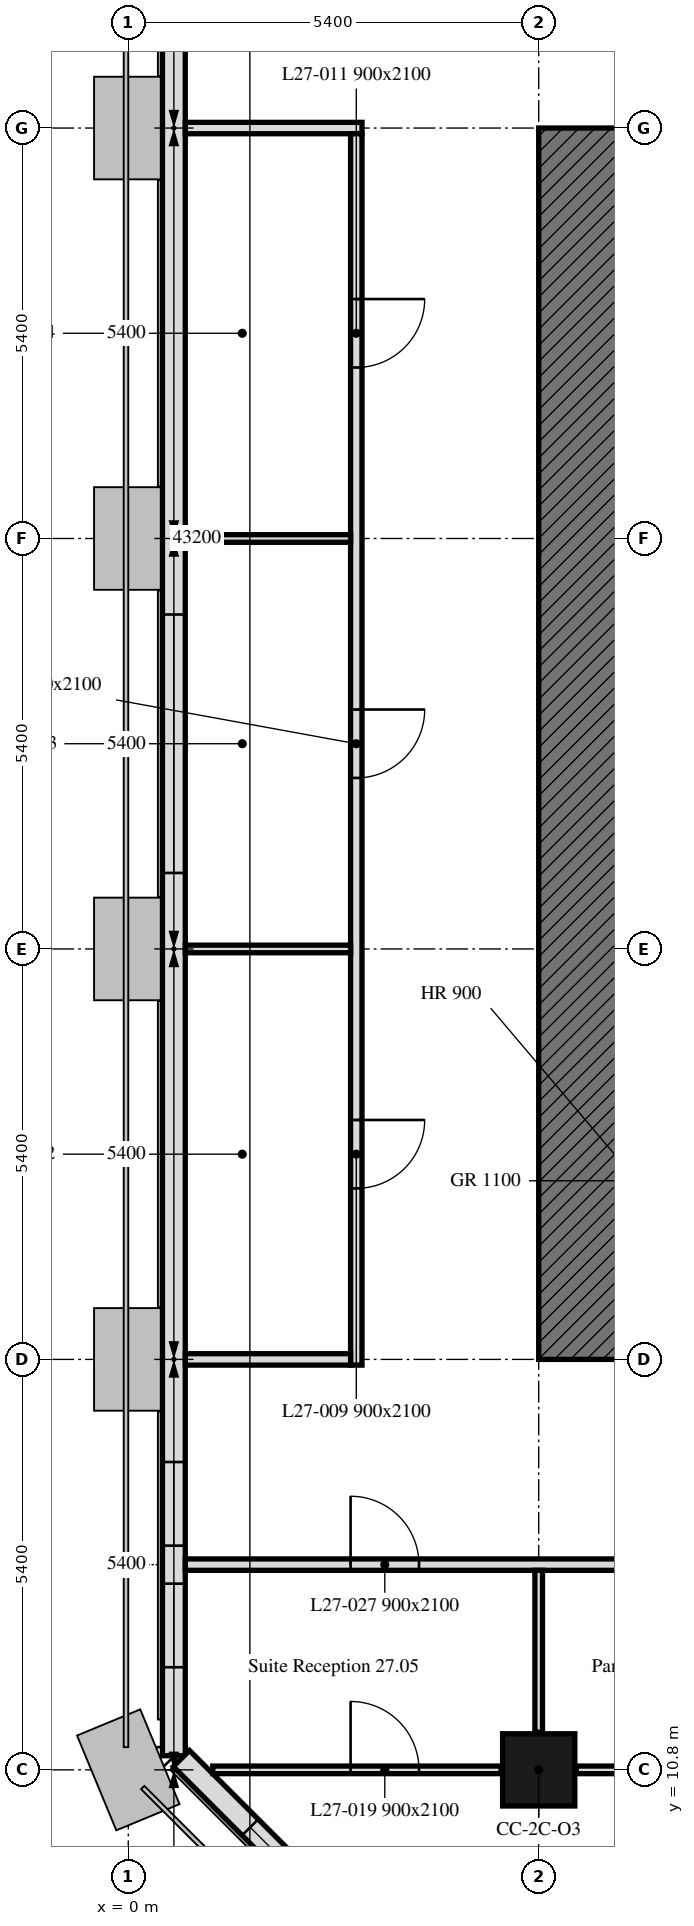
"""IFC4 building model, lengths in metres.
Left out: names, types, materials, properties, quantities, classifications, styles, units other than length and angle.
Written with IfcOpenShell. Run it as: python <this file> out.ifc"""

import sys

from ifc_helpers import new_model, si_unit, direction, frame, frame_2d, origin, origin_2d, place, context, subcontext, project, spatial, rectangle, extrude, element, fill, save


model = new_model("IFC4")
c1 = context("Model", 3, precision=1e-05, world=origin(), true_north=direction((0.0, 1.0)))
c2 = subcontext(c1, "Body", "Model", "MODEL_VIEW")
j1 = project(units=[si_unit("LENGTHUNIT", "METRE"), si_unit("PLANEANGLEUNIT", "RADIAN")], contexts=[c1])
p1 = place(None, origin())
s1 = spatial("IfcSite", under=j1, at=p1, CompositionType="ELEMENT")
p2 = place(p1, origin())
s2 = spatial("IfcBuilding", under=s1, at=p2, CompositionType="ELEMENT")
p3 = place(p2, frame((0.0, 0.0, 114.4)))
s3 = spatial("IfcBuildingStorey", under=s2, at=p3, CompositionType="ELEMENT", Elevation=114.4)
p4 = place(p3, frame((5.4, 10.8, 0.0), z_axis=(0.0, 0.0, 1.0), x_axis=(1.0, 0.0, 0.0)))
e1 = element("IfcColumn", 1, at=p4, inside=s3, PredefinedType="COLUMN", context=c2, shape_type="SweptSolid", body=[
    extrude(rectangle(XDim=0.95, YDim=0.95, at=origin_2d()), origin(), (0.0, 0.0, 1.0), 3.5),
])
p5 = place(p3, frame((0.6, 43.014, 0.0), z_axis=(0.0, 0.0, 1.0), x_axis=(0.0, -1.0, 0.0)))
e2 = element("IfcWall", 2, at=p5, inside=s3, PredefinedType="SOLIDWALL", context=c2, shape_type="SweptSolid", body=[
    extrude(rectangle(XDim=32.027, YDim=0.3, at=frame_2d((16.014, 0.0))), origin(), (0.0, 0.0, 1.0), 3.5),
])
p6 = place(p5, frame((6.564, 0.0, 0.9)))
e3 = element("IfcOpeningElement", 3, at=p6, cuts=e2, PredefinedType="OPENING", context=c2, shape_type="SweptSolid", body=[
    extrude(rectangle(XDim=1.1, YDim=1.7, at=frame_2d((0.55, 0.85))), frame((0.0, 0.16, 0.0), z_axis=(0.0, -1.0, 0.0), x_axis=(1.0, 0.0, 0.0)), (0.0, 0.0, 1.0), 0.32),
])
p7 = place(p5, frame((8.164, 0.0, 0.9)))
e4 = element("IfcOpeningElement", 4, at=p7, cuts=e2, PredefinedType="OPENING", context=c2, shape_type="SweptSolid", body=[
    extrude(rectangle(XDim=1.1, YDim=1.7, at=frame_2d((0.55, 0.85))), frame((0.0, 0.16, 0.0), z_axis=(0.0, -1.0, 0.0), x_axis=(1.0, 0.0, 0.0)), (0.0, 0.0, 1.0), 0.32),
])
p8 = place(p5, frame((17.014, 0.0, 0.9)))
e5 = element("IfcOpeningElement", 5, at=p8, cuts=e2, PredefinedType="OPENING", context=c2, shape_type="SweptSolid", body=[
    extrude(rectangle(XDim=3.4, YDim=1.7, at=frame_2d((1.7, 0.85))), frame((0.0, 0.16, 0.0), z_axis=(0.0, -1.0, 0.0), x_axis=(1.0, 0.0, 0.0)), (0.0, 0.0, 1.0), 0.32),
])
p9 = place(p5, frame((28.164, 0.0, 0.9)))
e6 = element("IfcOpeningElement", 6, at=p9, cuts=e2, PredefinedType="OPENING", context=c2, shape_type="SweptSolid", body=[
    extrude(rectangle(XDim=1.1, YDim=1.7, at=frame_2d((0.55, 0.85))), frame((0.0, 0.16, 0.0), z_axis=(0.0, -1.0, 0.0), x_axis=(1.0, 0.0, 0.0)), (0.0, 0.0, 1.0), 0.32),
])
p10 = place(p5, frame((29.764, 0.0, 0.9)))
e7 = element("IfcOpeningElement", 7, at=p10, cuts=e2, PredefinedType="OPENING", context=c2, shape_type="SweptSolid", body=[
    extrude(rectangle(XDim=1.1, YDim=1.7, at=frame_2d((0.55, 0.85))), frame((0.0, 0.16, 0.0), z_axis=(0.0, -1.0, 0.0), x_axis=(1.0, 0.0, 0.0)), (0.0, 0.0, 1.0), 0.32),
])
p11 = place(p3, frame((0.699, 10.949, 0.0), z_axis=(0.0, 0.0, 1.0), x_axis=(0.707106781187, -0.707106781187, 0.0)))
e8 = element("IfcWall", 8, at=p11, inside=s3, PredefinedType="SOLIDWALL", context=c2, shape_type="SweptSolid", body=[
    extrude(rectangle(XDim=6.86, YDim=0.3, at=frame_2d((3.43, 0.0))), origin(), (0.0, 0.0, 1.0), 3.5),
])
p12 = place(p11, frame((1.28, 0.0, 0.9)))
e9 = element("IfcOpeningElement", 9, at=p12, cuts=e8, PredefinedType="OPENING", context=c2, shape_type="SweptSolid", body=[
    extrude(rectangle(XDim=1.1, YDim=1.7, at=frame_2d((0.55, 0.85))), frame((0.0, 0.16, 0.0), z_axis=(0.0, -1.0, 0.0), x_axis=(1.0, 0.0, 0.0)), (0.0, 0.0, 1.0), 0.32),
])
p13 = place(p11, frame((4.48, 0.0, 0.9)))
e10 = element("IfcOpeningElement", 10, at=p13, cuts=e8, PredefinedType="OPENING", context=c2, shape_type="SweptSolid", body=[
    extrude(rectangle(XDim=1.1, YDim=1.7, at=frame_2d((0.55, 0.85))), frame((0.0, 0.16, 0.0), z_axis=(0.0, -1.0, 0.0), x_axis=(1.0, 0.0, 0.0)), (0.0, 0.0, 1.0), 0.32),
])
p14 = place(p3, frame((6.0, 16.2, 0.0), z_axis=(0.0, 0.0, 1.0), x_axis=(0.0, 1.0, 0.0)))
e11 = element("IfcWall", 11, at=p14, inside=s3, PredefinedType="SOLIDWALL", context=c2, shape_type="SweptSolid", body=[
    extrude(rectangle(XDim=16.2, YDim=1.2, at=frame_2d((8.1, 0.0))), origin(), (0.0, 0.0, 1.0), 3.5),
])
p15 = place(p3, frame((0.751, 32.4, 0.0), z_axis=(0.0, 0.0, 1.0), x_axis=(1.0, 0.0, 0.0)))
e12 = element("IfcWall", 12, at=p15, inside=s3, PredefinedType="PARTITIONING", context=c2, shape_type="SweptSolid", body=[
    extrude(rectangle(XDim=2.324, YDim=0.15, at=frame_2d((1.162, 0.0))), origin(), (0.0, 0.0, 1.0), 2.75),
])
p16 = place(p3, frame((3.0, 32.325, 0.0), z_axis=(0.0, 0.0, 1.0), x_axis=(0.0, -1.0, 0.0)))
e13 = element("IfcWall", 13, at=p16, inside=s3, PredefinedType="PARTITIONING", context=c2, shape_type="SweptSolid", body=[
    extrude(rectangle(XDim=16.2, YDim=0.15, at=frame_2d((8.1, 0.0))), origin(), (0.0, 0.0, 1.0), 2.75),
])
p17 = place(p16, frame((12.975, 0.0, 0.0)))
e14 = element("IfcOpeningElement", 14, at=p17, cuts=e13, PredefinedType="OPENING", context=c2, shape_type="SweptSolid", body=[
    extrude(rectangle(XDim=0.9, YDim=2.1, at=frame_2d((0.45, 1.05))), frame((0.0, 0.075, 0.0), z_axis=(0.0, -1.0, 0.0), x_axis=(1.0, 0.0, 0.0)), (0.0, 0.0, 1.0), 0.15),
])
p18 = place(p16, frame((7.575, 0.0, 0.0)))
e15 = element("IfcOpeningElement", 15, at=p18, cuts=e13, PredefinedType="OPENING", context=c2, shape_type="SweptSolid", body=[
    extrude(rectangle(XDim=0.9, YDim=2.1, at=frame_2d((0.45, 1.05))), frame((0.0, 0.075, 0.0), z_axis=(0.0, -1.0, 0.0), x_axis=(1.0, 0.0, 0.0)), (0.0, 0.0, 1.0), 0.15),
])
p19 = place(p16, frame((2.175, 0.0, 0.0)))
e16 = element("IfcOpeningElement", 16, at=p19, cuts=e13, PredefinedType="OPENING", context=c2, shape_type="SweptSolid", body=[
    extrude(rectangle(XDim=0.9, YDim=2.1, at=frame_2d((0.45, 1.05))), frame((0.0, 0.075, 0.0), z_axis=(0.0, -1.0, 0.0), x_axis=(1.0, 0.0, 0.0)), (0.0, 0.0, 1.0), 0.15),
])
p20 = place(p3, frame((2.925, 16.2, 0.0), z_axis=(0.0, 0.0, 1.0), x_axis=(-1.0, 0.0, 0.0)))
e17 = element("IfcWall", 17, at=p20, inside=s3, PredefinedType="PARTITIONING", context=c2, shape_type="SweptSolid", body=[
    extrude(rectangle(XDim=2.174, YDim=0.15, at=frame_2d((1.087, 0.0))), origin(), (0.0, 0.0, 1.0), 2.75),
])
p21 = place(p3, frame((0.751, 13.5, 0.0), z_axis=(0.0, 0.0, 1.0), x_axis=(1.0, 0.0, 0.0)))
e18 = element("IfcWall", 18, at=p21, inside=s3, PredefinedType="PARTITIONING", context=c2, shape_type="SweptSolid", body=[
    extrude(rectangle(XDim=41.698, YDim=0.15, at=frame_2d((20.849, 0.0))), origin(), (0.0, 0.0, 1.0), 3.5),
])
p22 = place(p21, frame((6.279, 0.0, 0.0)))
e19 = element("IfcOpeningElement", 19, at=p22, cuts=e18, PredefinedType="OPENING", context=c2, shape_type="SweptSolid", body=[
    extrude(rectangle(XDim=0.9, YDim=2.1, at=frame_2d((0.45, 1.05))), frame((0.0, 0.075, 0.0), z_axis=(0.0, -1.0, 0.0), x_axis=(1.0, 0.0, 0.0)), (0.0, 0.0, 1.0), 0.15),
])
p23 = place(p21, frame((7.519, 0.0, 0.0)))
e20 = element("IfcOpeningElement", 20, at=p23, cuts=e18, PredefinedType="OPENING", context=c2, shape_type="SweptSolid", body=[
    extrude(rectangle(XDim=0.9, YDim=2.1, at=frame_2d((0.45, 1.05))), frame((0.0, 0.075, 0.0), z_axis=(0.0, -1.0, 0.0), x_axis=(1.0, 0.0, 0.0)), (0.0, 0.0, 1.0), 0.15),
])
p24 = place(p21, frame((11.679, 0.0, 0.0)))
e21 = element("IfcOpeningElement", 21, at=p24, cuts=e18, PredefinedType="OPENING", context=c2, shape_type="SweptSolid", body=[
    extrude(rectangle(XDim=0.9, YDim=2.1, at=frame_2d((0.45, 1.05))), frame((0.0, 0.075, 0.0), z_axis=(0.0, -1.0, 0.0), x_axis=(1.0, 0.0, 0.0)), (0.0, 0.0, 1.0), 0.15),
])
p25 = place(p21, frame((22.479, 0.0, 0.0)))
e22 = element("IfcOpeningElement", 22, at=p25, cuts=e18, PredefinedType="OPENING", context=c2, shape_type="SweptSolid", body=[
    extrude(rectangle(XDim=0.9, YDim=2.1, at=frame_2d((0.45, 1.05))), frame((0.0, 0.075, 0.0), z_axis=(0.0, -1.0, 0.0), x_axis=(1.0, 0.0, 0.0)), (0.0, 0.0, 1.0), 0.15),
])
p26 = place(p21, frame((23.719, 0.0, 0.0)))
e23 = element("IfcOpeningElement", 23, at=p26, cuts=e18, PredefinedType="OPENING", context=c2, shape_type="SweptSolid", body=[
    extrude(rectangle(XDim=0.9, YDim=2.1, at=frame_2d((0.45, 1.05))), frame((0.0, 0.075, 0.0), z_axis=(0.0, -1.0, 0.0), x_axis=(1.0, 0.0, 0.0)), (0.0, 0.0, 1.0), 0.15),
])
p27 = place(p21, frame((2.174, 0.0, 0.0)))
e24 = element("IfcOpeningElement", 24, at=p27, cuts=e18, PredefinedType="OPENING", context=c2, shape_type="SweptSolid", body=[
    extrude(rectangle(XDim=0.9, YDim=2.1, at=frame_2d((0.45, 1.05))), frame((0.0, 0.075, 0.0), z_axis=(0.0, -1.0, 0.0), x_axis=(1.0, 0.0, 0.0)), (0.0, 0.0, 1.0), 0.15),
])
p28 = place(p21, frame((17.079, 0.0, 0.0)))
e25 = element("IfcOpeningElement", 25, at=p28, cuts=e18, PredefinedType="OPENING", context=c2, shape_type="SweptSolid", body=[
    extrude(rectangle(XDim=0.9, YDim=2.1, at=frame_2d((0.45, 1.05))), frame((0.0, 0.075, 0.0), z_axis=(0.0, -1.0, 0.0), x_axis=(1.0, 0.0, 0.0)), (0.0, 0.0, 1.0), 0.15),
])
p29 = place(p21, frame((34.519, 0.0, 0.0)))
e26 = element("IfcOpeningElement", 26, at=p29, cuts=e18, PredefinedType="OPENING", context=c2, shape_type="SweptSolid", body=[
    extrude(rectangle(XDim=0.9, YDim=2.1, at=frame_2d((0.45, 1.05))), frame((0.0, 0.075, 0.0), z_axis=(0.0, -1.0, 0.0), x_axis=(1.0, 0.0, 0.0)), (0.0, 0.0, 1.0), 0.15),
])
p30 = place(p3, frame((1.112, 10.8, 0.0), z_axis=(0.0, 0.0, 1.0), x_axis=(1.0, 0.0, 0.0)))
e27 = element("IfcWall", 27, at=p30, inside=s3, PredefinedType="PARTITIONING", context=c2, shape_type="SweptSolid", body=[
    extrude(rectangle(XDim=3.793, YDim=0.1, at=frame_2d((1.896, 0.0))), origin(), (0.0, 0.0, 1.0), 3.5),
])
p31 = place(p30, frame((1.813, 0.0, 0.0)))
e28 = element("IfcOpeningElement", 28, at=p31, cuts=e27, PredefinedType="OPENING", context=c2, shape_type="SweptSolid", body=[
    extrude(rectangle(XDim=0.9, YDim=2.1, at=frame_2d((0.45, 1.05))), frame((0.0, 0.05, 0.0), z_axis=(0.0, -1.0, 0.0), x_axis=(1.0, 0.0, 0.0)), (0.0, 0.0, 1.0), 0.1),
])
p32 = place(p3, frame((5.4, 11.295, 0.0), z_axis=(0.0, 0.0, 1.0), x_axis=(0.0, 1.0, 0.0)))
e29 = element("IfcWall", 29, at=p32, inside=s3, PredefinedType="PARTITIONING", context=c2, shape_type="SweptSolid", body=[
    extrude(rectangle(XDim=2.13, YDim=0.1, at=frame_2d((1.065, 0.0))), origin(), (0.0, 0.0, 1.0), 3.5),
])
p33 = place(p3, frame((5.895, 10.8, 0.0), z_axis=(0.0, 0.0, 1.0), x_axis=(1.0, 0.0, 0.0)))
e30 = element("IfcWall", 30, at=p33, inside=s3, PredefinedType="PARTITIONING", context=c2, shape_type="SweptSolid", body=[
    extrude(rectangle(XDim=4.41, YDim=0.1, at=frame_2d((2.205, 0.0))), origin(), (0.0, 0.0, 1.0), 3.5),
])
for number, where, z_axis, x_axis in (
    (31, (2.925, 21.6, 0.0), (0.0, 0.0, 1.0), (-1.0, 0.0, 0.0)),
    (32, (2.925, 27.0, 0.0), (0.0, 0.0, 1.0), (-1.0, 0.0, 0.0)),
):
    element("IfcWall", number, at=place(p3, frame(where, z_axis=z_axis, x_axis=x_axis)), inside=s3, PredefinedType="PARTITIONING", context=c2, shape_type="SweptSolid", body=[
        extrude(rectangle(XDim=2.174, YDim=0.1, at=frame_2d((1.087, 0.0))), origin(), (0.0, 0.0, 1.0), 2.75),
    ])
p34 = place(p8, origin())
e33 = element("IfcWindow", 33, at=p34, inside=s3, PartitioningType="SINGLE_PANEL", PredefinedType="WINDOW", context=c2, shape_type="SweptSolid", body=[
    extrude(rectangle(XDim=3.4, YDim=1.7, at=frame_2d((1.7, 0.85))), frame((0.0, 0.03, 0.0), z_axis=(0.0, -1.0, 0.0), x_axis=(1.0, 0.0, 0.0)), (0.0, 0.0, 1.0), 0.06),
])
fill(e5, e33)
p35 = place(p9, origin())
e34 = element("IfcWindow", 34, at=p35, inside=s3, PartitioningType="SINGLE_PANEL", PredefinedType="WINDOW", context=c2, shape_type="SweptSolid", body=[
    extrude(rectangle(XDim=1.1, YDim=1.7, at=frame_2d((0.55, 0.85))), frame((0.0, 0.03, 0.0), z_axis=(0.0, -1.0, 0.0), x_axis=(1.0, 0.0, 0.0)), (0.0, 0.0, 1.0), 0.06),
])
fill(e6, e34)
p36 = place(p10, origin())
e35 = element("IfcWindow", 35, at=p36, inside=s3, PartitioningType="SINGLE_PANEL", PredefinedType="WINDOW", context=c2, shape_type="SweptSolid", body=[
    extrude(rectangle(XDim=1.1, YDim=1.7, at=frame_2d((0.55, 0.85))), frame((0.0, 0.03, 0.0), z_axis=(0.0, -1.0, 0.0), x_axis=(1.0, 0.0, 0.0)), (0.0, 0.0, 1.0), 0.06),
])
fill(e7, e35)
p37 = place(p12, origin())
e36 = element("IfcWindow", 36, at=p37, inside=s3, PartitioningType="SINGLE_PANEL", PredefinedType="WINDOW", context=c2, shape_type="SweptSolid", body=[
    extrude(rectangle(XDim=1.1, YDim=1.7, at=frame_2d((0.55, 0.85))), frame((0.0, 0.03, 0.0), z_axis=(0.0, -1.0, 0.0), x_axis=(1.0, 0.0, 0.0)), (0.0, 0.0, 1.0), 0.06),
])
fill(e9, e36)
p38 = place(p17, origin())
e37 = element("IfcDoor", 37, at=p38, inside=s3, OperationType="SINGLE_SWING_LEFT", PredefinedType="DOOR", context=c2, shape_type="SweptSolid", body=[
    extrude(rectangle(XDim=0.9, YDim=2.1, at=frame_2d((0.45, 1.05))), frame((0.0, 0.025, 0.0), z_axis=(0.0, -1.0, 0.0), x_axis=(1.0, 0.0, 0.0)), (0.0, 0.0, 1.0), 0.05),
])
fill(e14, e37)
p39 = place(p18, origin())
e38 = element("IfcDoor", 38, at=p39, inside=s3, OperationType="SINGLE_SWING_LEFT", PredefinedType="DOOR", context=c2, shape_type="SweptSolid", body=[
    extrude(rectangle(XDim=0.9, YDim=2.1, at=frame_2d((0.45, 1.05))), frame((0.0, 0.025, 0.0), z_axis=(0.0, -1.0, 0.0), x_axis=(1.0, 0.0, 0.0)), (0.0, 0.0, 1.0), 0.05),
])
fill(e15, e38)
p40 = place(p19, origin())
e39 = element("IfcDoor", 39, at=p40, inside=s3, OperationType="SINGLE_SWING_LEFT", PredefinedType="DOOR", context=c2, shape_type="SweptSolid", body=[
    extrude(rectangle(XDim=0.9, YDim=2.1, at=frame_2d((0.45, 1.05))), frame((0.0, 0.025, 0.0), z_axis=(0.0, -1.0, 0.0), x_axis=(1.0, 0.0, 0.0)), (0.0, 0.0, 1.0), 0.05),
])
fill(e16, e39)
p41 = place(p31, origin())
e40 = element("IfcDoor", 40, at=p41, inside=s3, OperationType="SINGLE_SWING_RIGHT", PredefinedType="DOOR", context=c2, shape_type="SweptSolid", body=[
    extrude(rectangle(XDim=0.9, YDim=2.1, at=frame_2d((0.45, 1.05))), frame((0.0, 0.025, 0.0), z_axis=(0.0, -1.0, 0.0), x_axis=(1.0, 0.0, 0.0)), (0.0, 0.0, 1.0), 0.05),
])
fill(e28, e40)
p42 = place(p27, origin())
e41 = element("IfcDoor", 41, at=p42, inside=s3, OperationType="SINGLE_SWING_LEFT", PredefinedType="DOOR", context=c2, shape_type="SweptSolid", body=[
    extrude(rectangle(XDim=0.9, YDim=2.1, at=frame_2d((0.45, 1.05))), frame((0.0, 0.025, 0.0), z_axis=(0.0, -1.0, 0.0), x_axis=(1.0, 0.0, 0.0)), (0.0, 0.0, 1.0), 0.05),
])
fill(e24, e41)
save(model, sys.argv[1])
